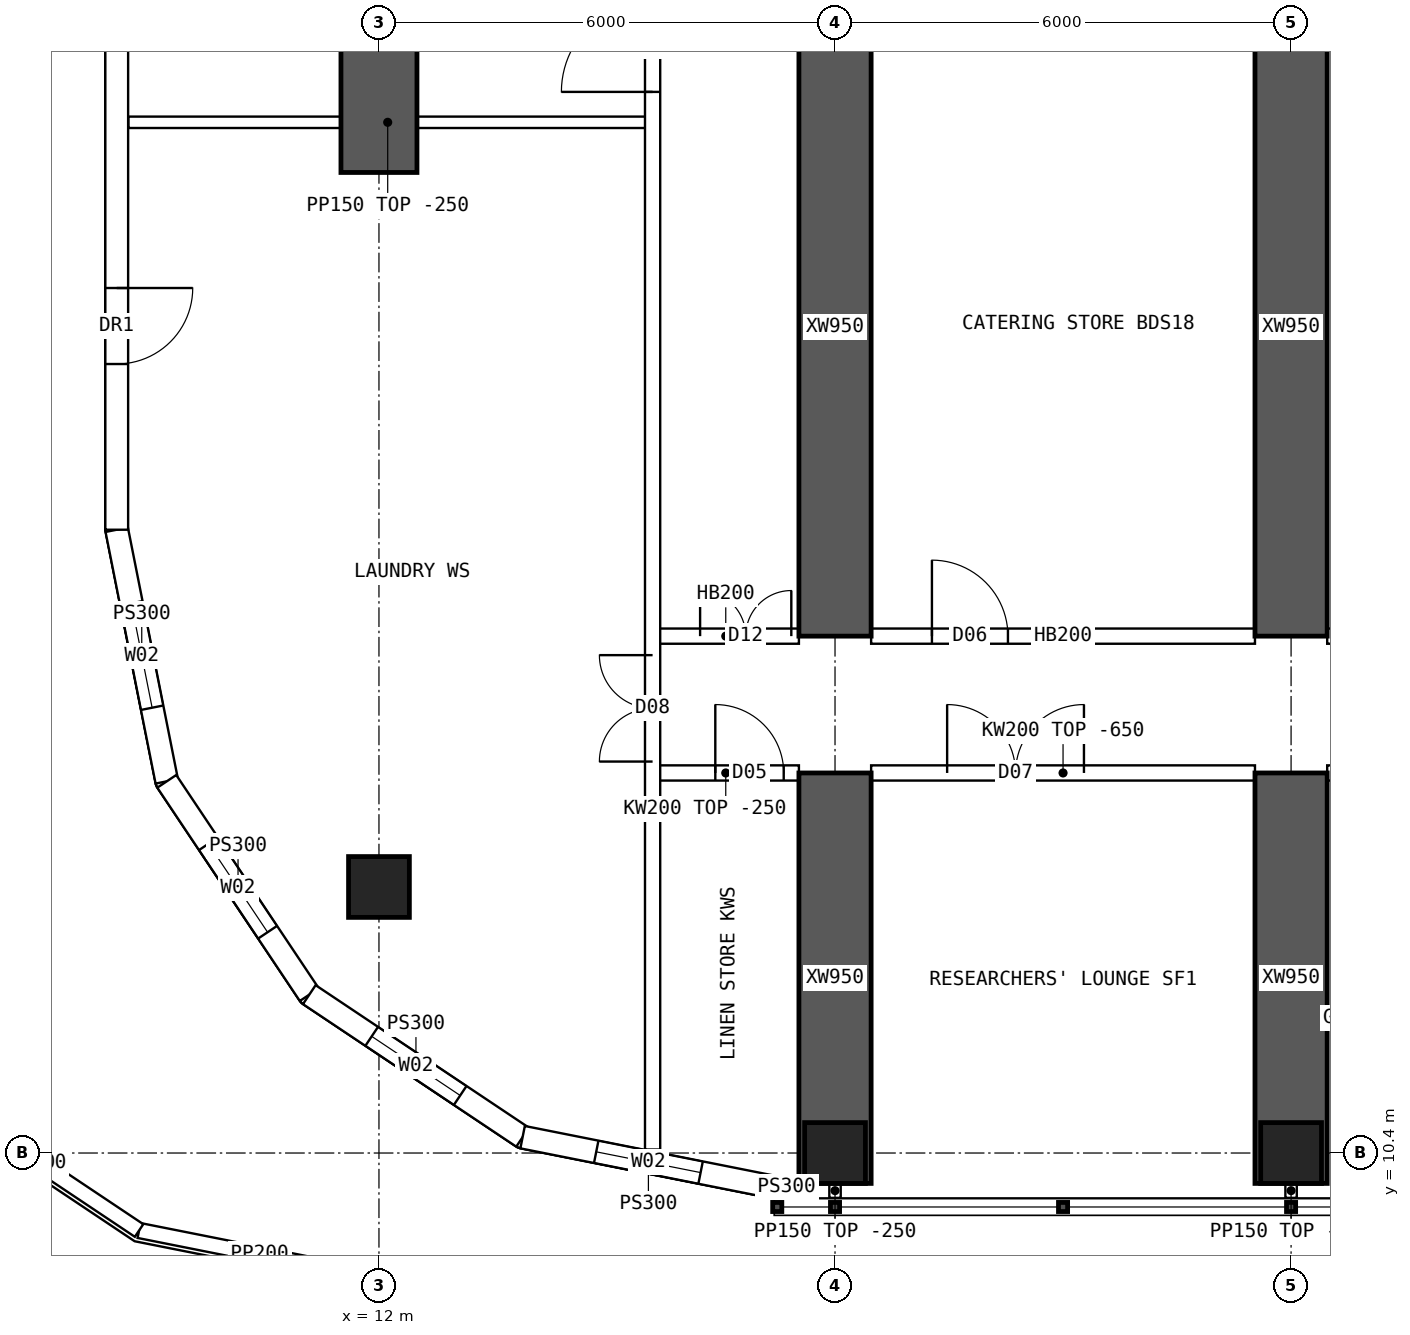
"""IFC4 building model, lengths in metres.
Left out: names, types, materials, properties, quantities, classifications, styles, units other than length and angle.
Written with IfcOpenShell. Run it as: python <this file> out.ifc"""

import sys

from ifc_helpers import new_model, si_unit, direction, frame, frame_2d, origin, origin_2d, place, context, subcontext, project, spatial, polyline, rectangle, hollow_rectangle, outline, extrude, element, fill, save


model = new_model("IFC4")
c1 = context("Model", 3, precision=1e-05, world=origin(), true_north=direction((0.0, 1.0)))
c2 = subcontext(c1, "Body", "Model", "MODEL_VIEW")
j1 = project(units=[si_unit("LENGTHUNIT", "METRE"), si_unit("PLANEANGLEUNIT", "RADIAN")], contexts=[c1])
p1 = place(None, origin())
s1 = spatial("IfcSite", under=j1, at=p1, CompositionType="ELEMENT")
p2 = place(p1, origin())
s2 = spatial("IfcBuilding", under=s1, at=p2, CompositionType="ELEMENT")
p3 = place(p2, frame((0.0, 0.0, 140.35)))
s3 = spatial("IfcBuildingStorey", under=s2, at=p3, CompositionType="ELEMENT", Elevation=140.35)
for number, where, z_axis, x_axis in (
    (1, (18.0, 10.4, 0.0), (0.0, 0.0, 1.0), (1.0, 0.0, 0.0)),
    (2, (24.0, 10.4, 0.0), (0.0, 0.0, 1.0), (1.0, 0.0, 0.0)),
    (3, (12.0, 13.9, 0.0), (0.0, 0.0, 1.0), (1.0, 0.0, 0.0)),
):
    element("IfcColumn", number, at=place(p3, frame(where, z_axis=z_axis, x_axis=x_axis)), inside=s3, PredefinedType="COLUMN", context=c2, shape_type="SweptSolid", body=[
        extrude(hollow_rectangle(XDim=0.8, YDim=0.8, WallThickness=0.08, at=origin_2d()), origin(), (0.0, 0.0, 1.0), 4.5),
    ])
p4 = place(p3, frame((12.0, 23.3, 0.0), z_axis=(0.0, 0.0, 1.0), x_axis=(0.0, 1.0, 0.0)))
e4 = element("IfcWall", 4, at=p4, inside=s3, PredefinedType="SHEAR", context=c2, shape_type="SweptSolid", body=[
    extrude(rectangle(XDim=5.0, YDim=1.0, at=frame_2d((2.5, 0.0))), origin(), (0.0, 0.0, 1.0), 4.5),
])
p5 = place(p3, frame((18.0, 10.0, 0.0), z_axis=(0.0, 0.0, 1.0), x_axis=(0.0, 1.0, 0.0)))
e5 = element("IfcWall", 5, at=p5, inside=s3, PredefinedType="SHEAR", context=c2, shape_type="SweptSolid", body=[
    extrude(rectangle(XDim=5.4, YDim=0.95, at=frame_2d((2.7, 0.0))), origin(), (0.0, 0.0, 1.0), 4.5),
])
p6 = place(p3, frame((18.0, 17.2, 0.0), z_axis=(0.0, 0.0, 1.0), x_axis=(0.0, 1.0, 0.0)))
e6 = element("IfcWall", 6, at=p6, inside=s3, PredefinedType="SHEAR", context=c2, shape_type="SweptSolid", body=[
    extrude(rectangle(XDim=8.125, YDim=0.95, at=frame_2d((4.062, 0.0))), origin(), (0.0, 0.0, 1.0), 4.5),
])
p7 = place(p3, frame((24.0, 10.0, 0.0), z_axis=(0.0, 0.0, 1.0), x_axis=(0.0, 1.0, 0.0)))
e7 = element("IfcWall", 7, at=p7, inside=s3, PredefinedType="SHEAR", context=c2, shape_type="SweptSolid", body=[
    extrude(rectangle(XDim=5.4, YDim=0.95, at=frame_2d((2.7, 0.0))), origin(), (0.0, 0.0, 1.0), 4.5),
])
p8 = place(p3, frame((24.0, 17.2, 0.0), z_axis=(0.0, 0.0, 1.0), x_axis=(0.0, 1.0, 0.0)))
e8 = element("IfcWall", 8, at=p8, inside=s3, PredefinedType="SHEAR", context=c2, shape_type="SweptSolid", body=[
    extrude(rectangle(XDim=8.125, YDim=0.95, at=frame_2d((4.062, 0.0))), origin(), (0.0, 0.0, 1.0), 4.5),
])
p9 = place(p3, frame((8.55, 45.4, 0.0), z_axis=(0.0, 0.0, 1.0), x_axis=(0.0, -1.0, 0.0)))
e9 = element("IfcWall", 9, at=p9, inside=s3, PredefinedType="SOLIDWALL", context=c2, shape_type="SweptSolid", body=[
    extrude(outline(polyline([(-0.015, -0.15), (26.815, -0.15), (26.785, 0.15), (0.015, 0.15), (-0.015, -0.15)])), origin(), (0.0, 0.0, 1.0), 4.25),
])
p10 = place(p9, frame((1.93, 0.0, 0.9)))
e10 = element("IfcOpeningElement", 10, at=p10, cuts=e9, PredefinedType="OPENING", context=c2, shape_type="SweptSolid", body=[
    extrude(rectangle(XDim=1.5, YDim=2.0, at=frame_2d((0.75, 1.0))), frame((0.0, 0.16, 0.0), z_axis=(0.0, -1.0, 0.0), x_axis=(1.0, 0.0, 0.0)), (0.0, 0.0, 1.0), 0.32),
])
p11 = place(p9, frame((7.29, 0.0, 0.9)))
e11 = element("IfcOpeningElement", 11, at=p11, cuts=e9, PredefinedType="OPENING", context=c2, shape_type="SweptSolid", body=[
    extrude(rectangle(XDim=1.5, YDim=2.0, at=frame_2d((0.75, 1.0))), frame((0.0, 0.16, 0.0), z_axis=(0.0, -1.0, 0.0), x_axis=(1.0, 0.0, 0.0)), (0.0, 0.0, 1.0), 0.32),
])
p12 = place(p9, frame((12.65, 0.0, 0.9)))
e12 = element("IfcOpeningElement", 12, at=p12, cuts=e9, PredefinedType="OPENING", context=c2, shape_type="SweptSolid", body=[
    extrude(rectangle(XDim=1.5, YDim=2.0, at=frame_2d((0.75, 1.0))), frame((0.0, 0.16, 0.0), z_axis=(0.0, -1.0, 0.0), x_axis=(1.0, 0.0, 0.0)), (0.0, 0.0, 1.0), 0.32),
])
p13 = place(p9, frame((18.01, 0.0, 0.9)))
e13 = element("IfcOpeningElement", 13, at=p13, cuts=e9, PredefinedType="OPENING", context=c2, shape_type="SweptSolid", body=[
    extrude(rectangle(XDim=1.5, YDim=2.0, at=frame_2d((0.75, 1.0))), frame((0.0, 0.16, 0.0), z_axis=(0.0, -1.0, 0.0), x_axis=(1.0, 0.0, 0.0)), (0.0, 0.0, 1.0), 0.32),
])
p14 = place(p9, frame((23.62, 0.0, 0.0)))
e14 = element("IfcOpeningElement", 14, at=p14, cuts=e9, PredefinedType="OPENING", context=c2, shape_type="SweptSolid", body=[
    extrude(rectangle(XDim=1.0, YDim=2.1, at=frame_2d((0.5, 1.05))), frame((0.0, 0.16, 0.0), z_axis=(0.0, -1.0, 0.0), x_axis=(1.0, 0.0, 0.0)), (0.0, 0.0, 1.0), 0.32),
])
p15 = place(p3, frame((8.55, 18.6, 0.0), z_axis=(0.0, 0.0, 1.0), x_axis=(0.19508664885, -0.980786011034, 0.0)))
e15 = element("IfcWall", 15, at=p15, inside=s3, PredefinedType="SOLIDWALL", context=c2, shape_type="SweptSolid", body=[
    extrude(outline(polyline([(-0.015, -0.15), (3.405, -0.15), (3.345, 0.15), (0.015, 0.15), (-0.015, -0.15)])), origin(), (0.0, 0.0, 1.0), 4.25),
])
p16 = place(p15, frame((0.988, 0.0, 0.9)))
e16 = element("IfcOpeningElement", 16, at=p16, cuts=e15, PredefinedType="OPENING", context=c2, shape_type="SweptSolid", body=[
    extrude(rectangle(XDim=1.4, YDim=1.8, at=frame_2d((0.7, 0.9))), frame((0.0, 0.16, 0.0), z_axis=(0.0, -1.0, 0.0), x_axis=(1.0, 0.0, 0.0)), (0.0, 0.0, 1.0), 0.32),
])
p17 = place(p3, frame((9.208, 15.29, 0.0), z_axis=(0.0, 0.0, 1.0), x_axis=(0.555534554399, -0.831493450887, 0.0)))
e17 = element("IfcWall", 17, at=p17, inside=s3, PredefinedType="SOLIDWALL", context=c2, shape_type="SweptSolid", body=[
    extrude(outline(polyline([(-0.03, -0.15), (3.405, -0.15), (3.345, 0.15), (0.03, 0.15), (-0.03, -0.15)])), origin(), (0.0, 0.0, 1.0), 4.25),
])
p18 = place(p17, frame((0.988, 0.0, 0.9)))
e18 = element("IfcOpeningElement", 18, at=p18, cuts=e17, PredefinedType="OPENING", context=c2, shape_type="SweptSolid", body=[
    extrude(rectangle(XDim=1.4, YDim=1.8, at=frame_2d((0.7, 0.9))), frame((0.0, 0.16, 0.0), z_axis=(0.0, -1.0, 0.0), x_axis=(1.0, 0.0, 0.0)), (0.0, 0.0, 1.0), 0.32),
])
p19 = place(p3, frame((11.083, 12.483, 0.0), z_axis=(0.0, 0.0, 1.0), x_axis=(0.831493450887, -0.555534554399, 0.0)))
e19 = element("IfcWall", 19, at=p19, inside=s3, PredefinedType="SOLIDWALL", context=c2, shape_type="SweptSolid", body=[
    extrude(outline(polyline([(-0.03, -0.15), (3.405, -0.15), (3.345, 0.15), (0.03, 0.15), (-0.03, -0.15)])), origin(), (0.0, 0.0, 1.0), 4.25),
])
p20 = place(p19, frame((0.988, 0.0, 0.9)))
e20 = element("IfcOpeningElement", 20, at=p20, cuts=e19, PredefinedType="OPENING", context=c2, shape_type="SweptSolid", body=[
    extrude(rectangle(XDim=1.4, YDim=1.8, at=frame_2d((0.7, 0.9))), frame((0.0, 0.16, 0.0), z_axis=(0.0, -1.0, 0.0), x_axis=(1.0, 0.0, 0.0)), (0.0, 0.0, 1.0), 0.32),
])
p21 = place(p3, frame((13.89, 10.608, 0.0), z_axis=(0.0, 0.0, 1.0), x_axis=(0.98078325777, -0.195100490205, 0.0)))
e21 = element("IfcWall", 21, at=p21, inside=s3, PredefinedType="SOLIDWALL", context=c2, shape_type="SweptSolid", body=[
    extrude(outline(polyline([(-0.03, -0.15), (3.405, -0.15), (3.345, 0.15), (0.03, 0.15), (-0.03, -0.15)])), origin(), (0.0, 0.0, 1.0), 4.25),
])
p22 = place(p21, frame((0.988, 0.0, 0.9)))
e22 = element("IfcOpeningElement", 22, at=p22, cuts=e21, PredefinedType="OPENING", context=c2, shape_type="SweptSolid", body=[
    extrude(rectangle(XDim=1.4, YDim=1.8, at=frame_2d((0.7, 0.9))), frame((0.0, 0.16, 0.0), z_axis=(0.0, -1.0, 0.0), x_axis=(1.0, 0.0, 0.0)), (0.0, 0.0, 1.0), 0.32),
])
p23 = place(p3, frame((17.2, 9.95, 0.0), z_axis=(0.0, 0.0, 1.0), x_axis=(1.0, 0.0, 0.0)))
e23 = element("IfcWall", 23, at=p23, inside=s3, PredefinedType="SOLIDWALL", context=c2, shape_type="SweptSolid", body=[
    extrude(rectangle(XDim=0.325, YDim=0.3, at=frame_2d((0.163, 0.0))), origin(), (0.0, 0.0, 1.0), 4.25),
])
p24 = place(p3, frame((12.015, 8.75, 0.0), z_axis=(0.0, 0.0, 1.0), x_axis=(-0.980792126237, 0.195055902531, 0.0)))
e24 = element("IfcWall", 24, at=p24, inside=s3, PredefinedType="PARAPET", context=c2, shape_type="SweptSolid", body=[
    extrude(rectangle(XDim=3.233, YDim=0.2, at=frame_2d((1.616, 0.0))), origin(), (0.0, 0.0, 1.0), 1.1),
])
p25 = place(p3, frame((8.844, 9.381, 0.0), z_axis=(0.0, 0.0, 1.0), x_axis=(-0.831454530953, 0.555592803191, 0.0)))
e25 = element("IfcWall", 25, at=p25, inside=s3, PredefinedType="PARAPET", context=c2, shape_type="SweptSolid", body=[
    extrude(rectangle(XDim=3.218, YDim=0.2, at=frame_2d((1.609, 0.0))), origin(), (0.0, 0.0, 1.0), 1.1),
])
p26 = place(p3, frame((15.6, 15.4, 0.0), z_axis=(0.0, 0.0, 1.0), x_axis=(1.0, 0.0, 0.0)))
e26 = element("IfcWall", 26, at=p26, inside=s3, PredefinedType="SOLIDWALL", context=c2, shape_type="SweptSolid", body=[
    extrude(rectangle(XDim=1.925, YDim=0.2, at=frame_2d((0.962, 0.0))), origin(), (0.0, 0.0, 1.0), 4.25),
])
p27 = place(p26, frame((0.825, 0.0, 0.0)))
e27 = element("IfcOpeningElement", 27, at=p27, cuts=e26, PredefinedType="OPENING", context=c2, shape_type="SweptSolid", body=[
    extrude(rectangle(XDim=0.9, YDim=2.1, at=frame_2d((0.45, 1.05))), frame((0.0, 0.11, 0.0), z_axis=(0.0, -1.0, 0.0), x_axis=(1.0, 0.0, 0.0)), (0.0, 0.0, 1.0), 0.22),
])
p28 = place(p3, frame((15.6, 17.2, 0.0), z_axis=(0.0, 0.0, 1.0), x_axis=(1.0, 0.0, 0.0)))
e28 = element("IfcWall", 28, at=p28, inside=s3, PredefinedType="SOLIDWALL", context=c2, shape_type="SweptSolid", body=[
    extrude(rectangle(XDim=1.925, YDim=0.2, at=frame_2d((0.962, 0.0))), origin(), (0.0, 0.0, 1.0), 4.25),
])
p29 = place(p28, frame((0.625, 0.0, 0.0)))
e29 = element("IfcOpeningElement", 29, at=p29, cuts=e28, PredefinedType="OPENING", context=c2, shape_type="SweptSolid", body=[
    extrude(rectangle(XDim=1.2, YDim=2.1, at=frame_2d((0.6, 1.05))), frame((0.0, 0.11, 0.0), z_axis=(0.0, -1.0, 0.0), x_axis=(1.0, 0.0, 0.0)), (0.0, 0.0, 1.0), 0.22),
])
p30 = place(p3, frame((18.475, 15.4, 0.0), z_axis=(0.0, 0.0, 1.0), x_axis=(1.0, 0.0, 0.0)))
e30 = element("IfcWall", 30, at=p30, inside=s3, PredefinedType="SOLIDWALL", context=c2, shape_type="SweptSolid", body=[
    extrude(outline(polyline([(0.0, 0.0), (5.05, 0.0), (5.05, 3.85), (0.0, 3.85), (0.0, 0.0)])), frame((0.0, 0.1, 0.0), z_axis=(0.0, -1.0, 0.0), x_axis=(1.0, 0.0, 0.0)), (0.0, 0.0, 1.0), 0.2),
])
p31 = place(p30, frame((1.0, 0.0, 0.0)))
e31 = element("IfcOpeningElement", 31, at=p31, cuts=e30, PredefinedType="OPENING", context=c2, shape_type="SweptSolid", body=[
    extrude(rectangle(XDim=1.8, YDim=2.1, at=frame_2d((0.9, 1.05))), frame((0.0, 0.11, 0.0), z_axis=(0.0, -1.0, 0.0), x_axis=(1.0, 0.0, 0.0)), (0.0, 0.0, 1.0), 0.22),
])
p32 = place(p3, frame((18.475, 17.2, 0.0), z_axis=(0.0, 0.0, 1.0), x_axis=(1.0, 0.0, 0.0)))
e32 = element("IfcWall", 32, at=p32, inside=s3, PredefinedType="SOLIDWALL", context=c2, shape_type="SweptSolid", body=[
    extrude(rectangle(XDim=5.05, YDim=0.2, at=frame_2d((2.525, 0.0))), origin(), (0.0, 0.0, 1.0), 4.25),
])
p33 = place(p32, frame((0.8, 0.0, 0.0)))
e33 = element("IfcOpeningElement", 33, at=p33, cuts=e32, PredefinedType="OPENING", context=c2, shape_type="SweptSolid", body=[
    extrude(rectangle(XDim=1.0, YDim=2.1, at=frame_2d((0.5, 1.05))), frame((0.0, 0.11, 0.0), z_axis=(0.0, -1.0, 0.0), x_axis=(1.0, 0.0, 0.0)), (0.0, 0.0, 1.0), 0.22),
])
p34 = place(p3, frame((24.475, 15.4, 0.0), z_axis=(0.0, 0.0, 1.0), x_axis=(1.0, 0.0, 0.0)))
e34 = element("IfcWall", 34, at=p34, inside=s3, PredefinedType="SOLIDWALL", context=c2, shape_type="SweptSolid", body=[
    extrude(outline(polyline([(0.0, 0.0), (5.05, 0.0), (5.05, 3.85), (0.0, 3.85), (0.0, 0.0)])), frame((0.0, 0.1, 0.0), z_axis=(0.0, -1.0, 0.0), x_axis=(1.0, 0.0, 0.0)), (0.0, 0.0, 1.0), 0.2),
])
p35 = place(p34, frame((0.3, 0.0, 0.0)))
e35 = element("IfcOpeningElement", 35, at=p35, cuts=e34, PredefinedType="OPENING", context=c2, shape_type="SweptSolid", body=[
    extrude(rectangle(XDim=0.9, YDim=2.1, at=frame_2d((0.45, 1.05))), frame((0.0, 0.11, 0.0), z_axis=(0.0, -1.0, 0.0), x_axis=(1.0, 0.0, 0.0)), (0.0, 0.0, 1.0), 0.22),
])
p36 = place(p3, frame((24.475, 17.2, 0.0), z_axis=(0.0, 0.0, 1.0), x_axis=(1.0, 0.0, 0.0)))
e36 = element("IfcWall", 36, at=p36, inside=s3, PredefinedType="SOLIDWALL", context=c2, shape_type="SweptSolid", body=[
    extrude(rectangle(XDim=5.05, YDim=0.2, at=frame_2d((2.525, 0.0))), origin(), (0.0, 0.0, 1.0), 4.25),
])
p37 = place(p36, frame((0.15, 0.0, 0.0)))
e37 = element("IfcOpeningElement", 37, at=p37, cuts=e36, PredefinedType="OPENING", context=c2, shape_type="SweptSolid", body=[
    extrude(rectangle(XDim=0.9, YDim=2.1, at=frame_2d((0.45, 1.05))), frame((0.0, 0.11, 0.0), z_axis=(0.0, -1.0, 0.0), x_axis=(1.0, 0.0, 0.0)), (0.0, 0.0, 1.0), 0.22),
])
p38 = place(p36, frame((2.425, 0.0, 0.0)))
e38 = element("IfcOpeningElement", 38, at=p38, cuts=e36, PredefinedType="OPENING", context=c2, shape_type="SweptSolid", body=[
    extrude(rectangle(XDim=0.9, YDim=2.1, at=frame_2d((0.45, 1.05))), frame((0.0, 0.11, 0.0), z_axis=(0.0, -1.0, 0.0), x_axis=(1.0, 0.0, 0.0)), (0.0, 0.0, 1.0), 0.22),
])
p39 = place(p3, frame((15.6, 10.446, 0.0), z_axis=(0.0, 0.0, 1.0), x_axis=(0.0, 1.0, 0.0)))
e39 = element("IfcWall", 39, at=p39, inside=s3, PredefinedType="SOLIDWALL", context=c2, shape_type="SweptSolid", body=[
    extrude(rectangle(XDim=43.107, YDim=0.2, at=frame_2d((21.554, 0.0))), origin(), (0.0, 0.0, 1.0), 4.25),
])
p40 = place(p39, frame((13.914, 0.0, 0.0)))
e40 = element("IfcOpeningElement", 40, at=p40, cuts=e39, PredefinedType="OPENING", context=c2, shape_type="SweptSolid", body=[
    extrude(rectangle(XDim=1.2, YDim=2.1, at=frame_2d((0.6, 1.05))), frame((0.0, 0.11, 0.0), z_axis=(0.0, -1.0, 0.0), x_axis=(1.0, 0.0, 0.0)), (0.0, 0.0, 1.0), 0.22),
])
p41 = place(p39, frame((22.634, 0.0, 0.0)))
e41 = element("IfcOpeningElement", 41, at=p41, cuts=e39, PredefinedType="OPENING", context=c2, shape_type="SweptSolid", body=[
    extrude(rectangle(XDim=1.2, YDim=2.1, at=frame_2d((0.6, 1.05))), frame((0.0, 0.11, 0.0), z_axis=(0.0, -1.0, 0.0), x_axis=(1.0, 0.0, 0.0)), (0.0, 0.0, 1.0), 0.22),
])
p42 = place(p39, frame((5.104, 0.0, 0.0)))
e42 = element("IfcOpeningElement", 42, at=p42, cuts=e39, PredefinedType="OPENING", context=c2, shape_type="SweptSolid", body=[
    extrude(rectangle(XDim=1.4, YDim=2.1, at=frame_2d((0.7, 1.05))), frame((0.0, 0.11, 0.0), z_axis=(0.0, -1.0, 0.0), x_axis=(1.0, 0.0, 0.0)), (0.0, 0.0, 1.0), 0.22),
])
p43 = place(p39, frame((36.504, 0.0, 0.0)))
e43 = element("IfcOpeningElement", 43, at=p43, cuts=e39, PredefinedType="OPENING", context=c2, shape_type="SweptSolid", body=[
    extrude(rectangle(XDim=1.4, YDim=2.1, at=frame_2d((0.7, 1.05))), frame((0.0, 0.11, 0.0), z_axis=(0.0, -1.0, 0.0), x_axis=(1.0, 0.0, 0.0)), (0.0, 0.0, 1.0), 0.22),
])
p44 = place(p3, frame((8.705, 23.96, 0.0), z_axis=(0.0, 0.0, 1.0), x_axis=(1.0, 0.0, 0.0)))
e44 = element("IfcWall", 44, at=p44, inside=s3, PredefinedType="PARTITIONING", context=c2, shape_type="SweptSolid", body=[
    extrude(rectangle(XDim=6.82, YDim=0.15, at=frame_2d((3.41, 0.0))), origin(), (0.0, 0.0, 1.0), 4.25),
])
for number, where, z_axis, x_axis in (
    (45, (18.0, 10.0, 0.0), (0.0, 0.0, 1.0), (0.0, -1.0, 0.0)),
    (46, (24.0, 10.0, 0.0), (0.0, 0.0, 1.0), (0.0, -1.0, 0.0)),
):
    element("IfcWall", number, at=place(p3, frame(where, z_axis=z_axis, x_axis=x_axis)), inside=s3, PredefinedType="PARTITIONING", context=c2, shape_type="SweptSolid", body=[
        extrude(rectangle(XDim=0.19, YDim=0.15, at=frame_2d((0.095, 0.0))), origin(), (0.0, 0.0, 1.0), 4.25),
    ])
p45 = place(p14, origin())
e47 = element("IfcDoor", 47, at=p45, inside=s3, OperationType="SINGLE_SWING_LEFT", PredefinedType="DOOR", context=c2, shape_type="SweptSolid", body=[
    extrude(rectangle(XDim=1.0, YDim=2.1, at=frame_2d((0.5, 1.05))), frame((0.0, 0.025, 0.0), z_axis=(0.0, -1.0, 0.0), x_axis=(1.0, 0.0, 0.0)), (0.0, 0.0, 1.0), 0.05),
])
fill(e14, e47)
p46 = place(p16, origin())
e48 = element("IfcWindow", 48, at=p46, inside=s3, PartitioningType="SINGLE_PANEL", PredefinedType="WINDOW", context=c2, shape_type="SweptSolid", body=[
    extrude(rectangle(XDim=1.4, YDim=1.8, at=frame_2d((0.7, 0.9))), frame((0.0, 0.03, 0.0), z_axis=(0.0, -1.0, 0.0), x_axis=(1.0, 0.0, 0.0)), (0.0, 0.0, 1.0), 0.06),
])
fill(e16, e48)
p47 = place(p18, origin())
e49 = element("IfcWindow", 49, at=p47, inside=s3, PartitioningType="SINGLE_PANEL", PredefinedType="WINDOW", context=c2, shape_type="SweptSolid", body=[
    extrude(rectangle(XDim=1.4, YDim=1.8, at=frame_2d((0.7, 0.9))), frame((0.0, 0.03, 0.0), z_axis=(0.0, -1.0, 0.0), x_axis=(1.0, 0.0, 0.0)), (0.0, 0.0, 1.0), 0.06),
])
fill(e18, e49)
p48 = place(p20, origin())
e50 = element("IfcWindow", 50, at=p48, inside=s3, PartitioningType="SINGLE_PANEL", PredefinedType="WINDOW", context=c2, shape_type="SweptSolid", body=[
    extrude(rectangle(XDim=1.4, YDim=1.8, at=frame_2d((0.7, 0.9))), frame((0.0, 0.03, 0.0), z_axis=(0.0, -1.0, 0.0), x_axis=(1.0, 0.0, 0.0)), (0.0, 0.0, 1.0), 0.06),
])
fill(e20, e50)
p49 = place(p22, origin())
e51 = element("IfcWindow", 51, at=p49, inside=s3, PartitioningType="SINGLE_PANEL", PredefinedType="WINDOW", context=c2, shape_type="SweptSolid", body=[
    extrude(rectangle(XDim=1.4, YDim=1.8, at=frame_2d((0.7, 0.9))), frame((0.0, 0.03, 0.0), z_axis=(0.0, -1.0, 0.0), x_axis=(1.0, 0.0, 0.0)), (0.0, 0.0, 1.0), 0.06),
])
fill(e22, e51)
p50 = place(p29, origin())
e52 = element("IfcDoor", 52, at=p50, inside=s3, OperationType="DOUBLE_DOOR_SINGLE_SWING", PredefinedType="DOOR", context=c2, shape_type="SweptSolid", body=[
    extrude(rectangle(XDim=1.2, YDim=2.1, at=frame_2d((0.6, 1.05))), frame((0.0, 0.025, 0.0), z_axis=(0.0, -1.0, 0.0), x_axis=(1.0, 0.0, 0.0)), (0.0, 0.0, 1.0), 0.05),
])
fill(e29, e52)
p51 = place(p31, origin())
e53 = element("IfcDoor", 53, at=p51, inside=s3, OperationType="DOUBLE_DOOR_SINGLE_SWING", PredefinedType="DOOR", context=c2, shape_type="SweptSolid", body=[
    extrude(rectangle(XDim=1.8, YDim=2.1, at=frame_2d((0.9, 1.05))), frame((0.0, 0.025, 0.0), z_axis=(0.0, -1.0, 0.0), x_axis=(1.0, 0.0, 0.0)), (0.0, 0.0, 1.0), 0.05),
])
fill(e31, e53)
p52 = place(p33, origin())
e54 = element("IfcDoor", 54, at=p52, inside=s3, OperationType="SINGLE_SWING_LEFT", PredefinedType="DOOR", context=c2, shape_type="SweptSolid", body=[
    extrude(rectangle(XDim=1.0, YDim=2.1, at=frame_2d((0.5, 1.05))), frame((0.0, 0.025, 0.0), z_axis=(0.0, -1.0, 0.0), x_axis=(1.0, 0.0, 0.0)), (0.0, 0.0, 1.0), 0.05),
])
fill(e33, e54)
p53 = place(p40, origin())
e55 = element("IfcDoor", 55, at=p53, inside=s3, OperationType="SINGLE_SWING_LEFT", PredefinedType="DOOR", context=c2, shape_type="SweptSolid", body=[
    extrude(rectangle(XDim=1.2, YDim=2.1, at=frame_2d((0.6, 1.05))), frame((0.0, 0.025, 0.0), z_axis=(0.0, -1.0, 0.0), x_axis=(1.0, 0.0, 0.0)), (0.0, 0.0, 1.0), 0.05),
])
fill(e40, e55)
p54 = place(p42, origin())
e56 = element("IfcDoor", 56, at=p54, inside=s3, OperationType="DOUBLE_DOOR_SINGLE_SWING", PredefinedType="DOOR", context=c2, shape_type="SweptSolid", body=[
    extrude(rectangle(XDim=1.4, YDim=2.1, at=frame_2d((0.7, 1.05))), frame((0.0, 0.025, 0.0), z_axis=(0.0, -1.0, 0.0), x_axis=(1.0, 0.0, 0.0)), (0.0, 0.0, 1.0), 0.05),
])
fill(e42, e56)
p55 = place(p27, origin())
e57 = element("IfcDoor", 57, at=p55, inside=s3, OperationType="SINGLE_SWING_LEFT", PredefinedType="DOOR", context=c2, shape_type="SweptSolid", body=[
    extrude(rectangle(XDim=0.9, YDim=2.1, at=frame_2d((0.45, 1.05))), frame((0.0, 0.025, 0.0), z_axis=(0.0, -1.0, 0.0), x_axis=(1.0, 0.0, 0.0)), (0.0, 0.0, 1.0), 0.05),
])
fill(e27, e57)
save(model, sys.argv[1])
